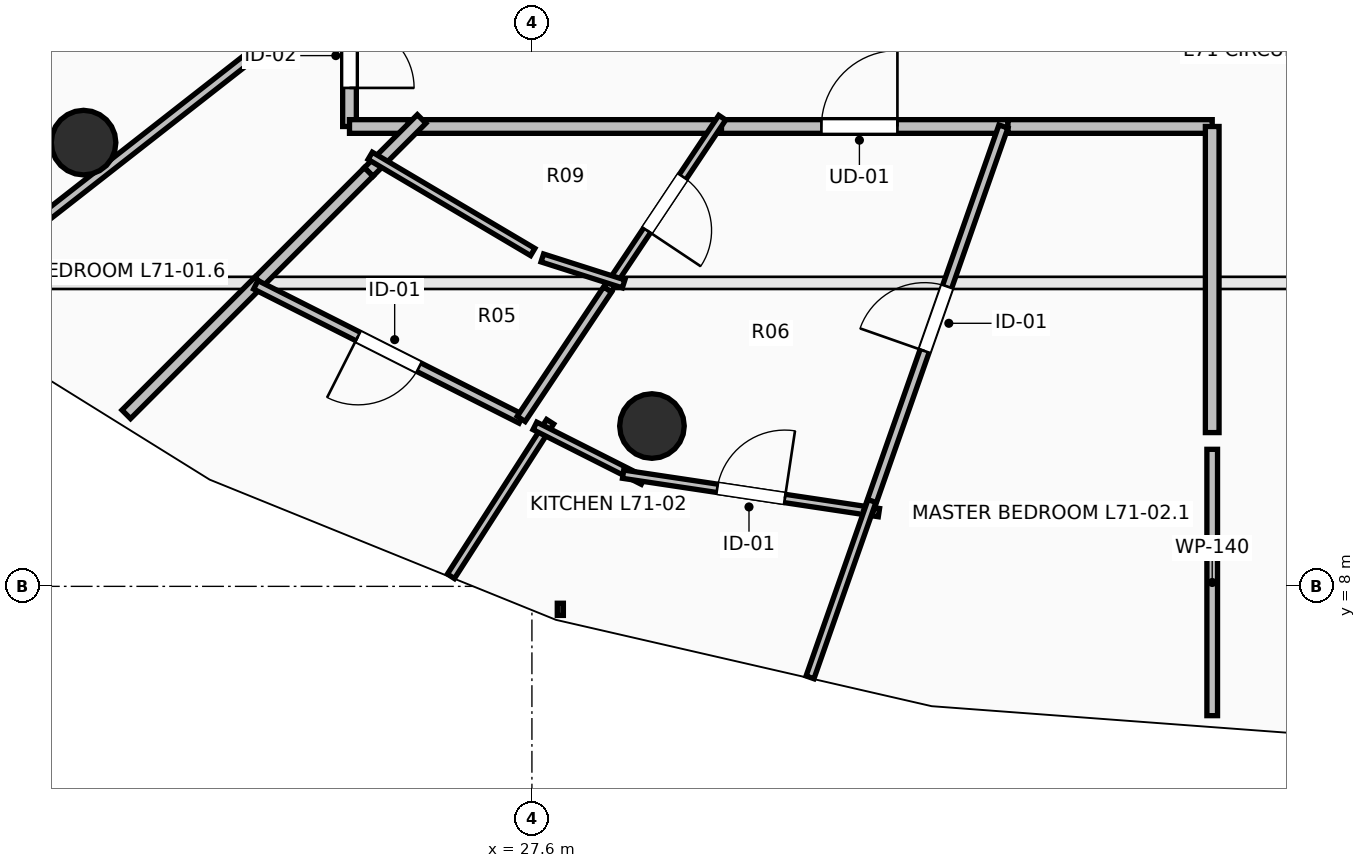
"""IFC4 building model, lengths in metres.
Left out: names, types, materials, properties, quantities, classifications, styles, units other than length and angle.
Written with IfcOpenShell. Run it as: python <this file> out.ifc"""

import sys

from ifc_helpers import new_model, si_unit, direction, frame, frame_2d, origin, origin_2d, place, context, subcontext, project, spatial, rectangle, circle, extrude, element, fill, save


model = new_model("IFC4")
c1 = context("Model", 3, precision=1e-05, world=origin(), true_north=direction((0.0, 1.0)))
c2 = subcontext(c1, "Body", "Model", "MODEL_VIEW")
j1 = project(units=[si_unit("LENGTHUNIT", "METRE"), si_unit("PLANEANGLEUNIT", "RADIAN")], contexts=[c1])
p1 = place(None, origin())
s1 = spatial("IfcSite", under=j1, at=p1, CompositionType="ELEMENT")
p2 = place(p1, origin())
s2 = spatial("IfcBuilding", under=s1, at=p2, CompositionType="ELEMENT")
p3 = place(p2, frame((0.0, 0.0, 262.65)))
s3 = spatial("IfcBuildingStorey", under=s2, at=p3, CompositionType="ELEMENT", Elevation=262.65)
for number, where, z_axis, x_axis in (
    (1, (21.701, 13.838, 0.0), (0.0, 0.0, 1.0), (-0.707, -0.707, 0.0)),
    (2, (29.179, 10.109, 0.0), (0.0, 0.0, 1.0), (-0.383, -0.924, 0.0)),
):
    element("IfcColumn", number, at=place(p3, frame(where, z_axis=z_axis, x_axis=x_axis)), inside=s3, PredefinedType="COLUMN", context=c2, shape_type="SweptSolid", body=[
        extrude(circle(Radius=0.425, at=origin_2d()), origin(), (0.0, 0.0, 1.0), 3.55),
    ])
p4 = place(p3, frame((25.2, 15.915, 0.0), z_axis=(0.0, 0.0, 1.0), x_axis=(0.0, -1.0, 0.0)))
e3 = element("IfcWall", 3, at=p4, inside=s3, PredefinedType="PARTITIONING", context=c2, shape_type="SweptSolid", body=[
    extrude(rectangle(XDim=1.865, YDim=0.18, at=frame_2d((0.933, 0.0))), origin(), (0.0, 0.0, 1.0), 2.482),
])
p5 = place(p4, frame((0.508, 0.0, 0.0)))
e4 = element("IfcOpeningElement", 4, at=p5, cuts=e3, PredefinedType="OPENING", context=c2, shape_type="SweptSolid", body=[
    extrude(rectangle(XDim=0.85, YDim=2.1, at=frame_2d((0.425, 1.05))), frame((0.0, 0.105, 0.0), z_axis=(0.0, -1.0, 0.0), x_axis=(1.0, 0.0, 0.0)), (0.0, 0.0, 1.0), 0.21),
])
p6 = place(p3, frame((25.2, 14.05, 0.0), z_axis=(0.0, 0.0, 1.0), x_axis=(1.0, 0.0, 0.0)))
e5 = element("IfcWall", 5, at=p6, inside=s3, PredefinedType="PARTITIONING", context=c2, shape_type="SweptSolid", body=[
    extrude(rectangle(XDim=0.91, YDim=0.18, at=frame_2d((0.455, 0.0))), origin(), (0.0, 0.0, 1.0), 3.022),
])
p7 = place(p3, frame((29.954, 14.05, 0.0), z_axis=(0.0, 0.0, 1.0), x_axis=(1.0, 0.0, 0.0)))
e6 = element("IfcWall", 6, at=p7, inside=s3, PredefinedType="PARTITIONING", context=c2, shape_type="SweptSolid", body=[
    extrude(rectangle(XDim=3.909, YDim=0.18, at=frame_2d((1.955, 0.0))), origin(), (0.0, 0.0, 1.0), 2.936),
])
p8 = place(p7, frame((1.455, 0.0, 0.0)))
e7 = element("IfcOpeningElement", 7, at=p8, cuts=e6, PredefinedType="OPENING", context=c2, shape_type="SweptSolid", body=[
    extrude(rectangle(XDim=1.0, YDim=2.15, at=frame_2d((0.5, 1.075))), frame((0.0, 0.105, 0.0), z_axis=(0.0, -1.0, 0.0), x_axis=(1.0, 0.0, 0.0)), (0.0, 0.0, 1.0), 0.21),
])
p9 = place(p3, frame((25.97, 14.05, 0.0), z_axis=(0.0, 0.0, 1.0), x_axis=(1.0, 0.0, 0.0)))
e8 = element("IfcWall", 8, at=p9, inside=s3, PredefinedType="PARTITIONING", context=c2, shape_type="SweptSolid", body=[
    extrude(rectangle(XDim=4.124, YDim=0.18, at=frame_2d((2.062, 0.0))), origin(), (0.0, 0.0, 1.0), 2.482),
])
p10 = place(p3, frame((33.863, 14.05, 0.0), z_axis=(0.0, 0.0, 1.0), x_axis=(1.0, 0.0, 0.0)))
e9 = element("IfcWall", 9, at=p10, inside=s3, PredefinedType="PARTITIONING", context=c2, shape_type="SweptSolid", body=[
    extrude(rectangle(XDim=2.687, YDim=0.18, at=frame_2d((1.344, 0.0))), origin(), (0.0, 0.0, 1.0), 2.936),
])
p11 = place(p3, frame((36.55, 14.05, 0.0), z_axis=(0.0, 0.0, 1.0), x_axis=(0.0, -1.0, 0.0)))
e10 = element("IfcWall", 10, at=p11, inside=s3, PredefinedType="PARTITIONING", context=c2, shape_type="SweptSolid", body=[
    extrude(rectangle(XDim=4.027, YDim=0.18, at=frame_2d((2.014, 0.0))), origin(), (0.0, 0.0, 1.0), 2.936),
])
p12 = place(p3, frame((17.602, 13.72, 0.0), z_axis=(0.0, 0.0, 1.0), x_axis=(0.856734134601, 0.515758298633, 0.0)))
e11 = element("IfcWall", 11, at=p12, inside=s3, PredefinedType="PARTITIONING", context=c2, shape_type="SweptSolid", body=[
    extrude(rectangle(XDim=8.868, YDim=0.125, at=frame_2d((4.434, 0.0))), origin(), (0.0, 0.0, 1.0), 2.482),
])
p13 = place(p3, frame((19.819, 11.782, 0.0), z_axis=(0.0, 0.0, 1.0), x_axis=(0.78765580417, 0.61611552014, 0.0)))
e12 = element("IfcWall", 12, at=p13, inside=s3, PredefinedType="PARTITIONING", context=c2, shape_type="SweptSolid", body=[
    extrude(rectangle(XDim=6.832, YDim=0.125, at=frame_2d((3.416, 0.0))), origin(), (0.0, 0.0, 1.0), 2.482),
])
p14 = place(p3, frame((22.263, 10.263, 0.0), z_axis=(0.0, 0.0, 1.0), x_axis=(0.707106781187, 0.707106781187, 0.0)))
e13 = element("IfcWall", 13, at=p14, inside=s3, PredefinedType="PARTITIONING", context=c2, shape_type="SweptSolid", body=[
    extrude(rectangle(XDim=2.473, YDim=0.16, at=frame_2d((1.237, 0.0))), origin(), (0.0, 0.0, 1.0), 3.29),
])
p15 = place(p3, frame((25.452, 13.452, 0.0), z_axis=(0.0, 0.0, 1.0), x_axis=(0.707106781187, 0.707106781187, 0.0)))
e14 = element("IfcWall", 14, at=p15, inside=s3, PredefinedType="PARTITIONING", context=c2, shape_type="SweptSolid", body=[
    extrude(rectangle(XDim=0.986, YDim=0.16, at=frame_2d((0.493, 0.0))), origin(), (0.0, 0.0, 1.0), 3.022),
])
p16 = place(p3, frame((24.012, 12.012, 0.0), z_axis=(0.0, 0.0, 1.0), x_axis=(0.707106781187, 0.707106781187, 0.0)))
e15 = element("IfcWall", 15, at=p16, inside=s3, PredefinedType="PARTITIONING", context=c2, shape_type="SweptSolid", body=[
    extrude(rectangle(XDim=2.036, YDim=0.16, at=frame_2d((1.018, 0.0))), origin(), (0.0, 0.0, 1.0), 2.874),
])
p17 = place(p3, frame((30.104, 14.167, 0.0), z_axis=(0.0, 0.0, 1.0), x_axis=(-0.555011080332, -0.831842954354, 0.0)))
e16 = element("IfcWall", 16, at=p17, inside=s3, PredefinedType="PARTITIONING", context=c2, shape_type="SweptSolid", body=[
    extrude(rectangle(XDim=2.718, YDim=0.11, at=frame_2d((1.359, 0.0))), origin(), (0.0, 0.0, 1.0), 2.482),
])
p18 = place(p17, frame((0.934, 0.0, 0.0)))
e17 = element("IfcOpeningElement", 17, at=p18, cuts=e16, PredefinedType="OPENING", context=c2, shape_type="SweptSolid", body=[
    extrude(rectangle(XDim=0.85, YDim=2.1, at=frame_2d((0.425, 1.05))), frame((0.0, 0.07, 0.0), z_axis=(0.0, -1.0, 0.0), x_axis=(1.0, 0.0, 0.0)), (0.0, 0.0, 1.0), 0.14),
])
p19 = place(p3, frame((26.534, 8.132, 0.0), z_axis=(0.0, 0.0, 1.0), x_axis=(0.540114041626, 0.841591838149, 0.0)))
e18 = element("IfcWall", 18, at=p19, inside=s3, PredefinedType="PARTITIONING", context=c2, shape_type="SweptSolid", body=[
    extrude(rectangle(XDim=2.417, YDim=0.11, at=frame_2d((1.208, 0.0))), origin(), (0.0, 0.0, 1.0), 3.29),
])
p20 = place(p3, frame((27.639, 10.111, 0.0), z_axis=(0.0, 0.0, 1.0), x_axis=(0.892614165752, -0.45082141819, 0.0)))
e19 = element("IfcWall", 19, at=p20, inside=s3, PredefinedType="PARTITIONING", context=c2, shape_type="SweptSolid", body=[
    extrude(rectangle(XDim=1.595, YDim=0.11, at=frame_2d((0.798, 0.0))), origin(), (0.0, 0.0, 1.0), 3.29),
])
p21 = place(p3, frame((28.8, 9.476, 0.0), z_axis=(0.0, 0.0, 1.0), x_axis=(0.988903707347, -0.148557926731, 0.0)))
e20 = element("IfcWall", 20, at=p21, inside=s3, PredefinedType="PARTITIONING", context=c2, shape_type="SweptSolid", body=[
    extrude(rectangle(XDim=3.404, YDim=0.11, at=frame_2d((1.702, 0.0))), origin(), (0.0, 0.0, 1.0), 3.29),
])
p22 = place(p21, frame((1.252, 0.0, 0.0)))
e21 = element("IfcOpeningElement", 21, at=p22, cuts=e20, PredefinedType="OPENING", context=c2, shape_type="SweptSolid", body=[
    extrude(rectangle(XDim=0.9, YDim=2.1, at=frame_2d((0.45, 1.05))), frame((0.0, 0.07, 0.0), z_axis=(0.0, -1.0, 0.0), x_axis=(1.0, 0.0, 0.0)), (0.0, 0.0, 1.0), 0.14),
])
p23 = place(p3, frame((27.459, 10.203, 0.0), z_axis=(0.0, 0.0, 1.0), x_axis=(-0.892559828496, 0.450928988374, 0.0)))
e22 = element("IfcWall", 22, at=p23, inside=s3, PredefinedType="PARTITIONING", context=c2, shape_type="SweptSolid", body=[
    extrude(rectangle(XDim=3.912, YDim=0.125, at=frame_2d((1.956, 0.0))), origin(), (0.0, 0.0, 1.0), 3.29),
])
p24 = place(p23, frame((1.506, 0.0, 0.0)))
e23 = element("IfcOpeningElement", 23, at=p24, cuts=e22, PredefinedType="OPENING", context=c2, shape_type="SweptSolid", body=[
    extrude(rectangle(XDim=0.9, YDim=2.1, at=frame_2d((0.45, 1.05))), frame((0.0, 0.077, 0.0), z_axis=(0.0, -1.0, 0.0), x_axis=(1.0, 0.0, 0.0)), (0.0, 0.0, 1.0), 0.155),
])
p25 = place(p3, frame((28.595, 11.906, 0.0), z_axis=(0.0, 0.0, 1.0), x_axis=(-0.555085472594, -0.831793314541, 0.0)))
e24 = element("IfcWall", 24, at=p25, inside=s3, PredefinedType="PARTITIONING", context=c2, shape_type="SweptSolid", body=[
    extrude(rectangle(XDim=2.047, YDim=0.125, at=frame_2d((1.023, 0.0))), origin(), (0.0, 0.0, 1.0), 2.482),
])
p26 = place(p3, frame((32.027, 8.991, 0.0), z_axis=(0.0, 0.0, 1.0), x_axis=(0.331214316781, 0.943555550224, 0.0)))
e25 = element("IfcWall", 25, at=p26, inside=s3, PredefinedType="PARTITIONING", context=c2, shape_type="SweptSolid", body=[
    extrude(rectangle(XDim=5.362, YDim=0.125, at=frame_2d((2.681, 0.0))), origin(), (0.0, 0.0, 1.0), 2.874),
])
p27 = place(p26, frame((2.231, 0.0, 0.0)))
e26 = element("IfcOpeningElement", 26, at=p27, cuts=e25, PredefinedType="OPENING", context=c2, shape_type="SweptSolid", body=[
    extrude(rectangle(XDim=0.9, YDim=2.1, at=frame_2d((0.45, 1.05))), frame((0.0, 0.077, 0.0), z_axis=(0.0, -1.0, 0.0), x_axis=(1.0, 0.0, 0.0)), (0.0, 0.0, 1.0), 0.155),
])
p28 = place(p3, frame((25.472, 13.664, 0.0), z_axis=(0.0, 0.0, 1.0), x_axis=(0.860546797705, -0.509371386082, 0.0)))
e27 = element("IfcWall", 27, at=p28, inside=s3, PredefinedType="PARTITIONING", context=c2, shape_type="SweptSolid", body=[
    extrude(rectangle(XDim=2.485, YDim=0.11, at=frame_2d((1.242, 0.0))), origin(), (0.0, 0.0, 1.0), 3.022),
])
p29 = place(p3, frame((27.737, 12.321, 0.0), z_axis=(0.0, 0.0, 1.0), x_axis=(0.952754298981, -0.303742071127, 0.0)))
e28 = element("IfcWall", 28, at=p29, inside=s3, PredefinedType="PARTITIONING", context=c2, shape_type="SweptSolid", body=[
    extrude(rectangle(XDim=1.123, YDim=0.11, at=frame_2d((0.562, 0.0))), origin(), (0.0, 0.0, 1.0), 2.482),
])
p30 = place(p3, frame((31.259, 6.803, 0.0), z_axis=(0.0, 0.0, 1.0), x_axis=(0.331407174133, 0.943487829775, 0.0)))
e29 = element("IfcWall", 29, at=p30, inside=s3, PredefinedType="PARTITIONING", context=c2, shape_type="SweptSolid", body=[
    extrude(rectangle(XDim=2.459, YDim=0.11, at=frame_2d((1.229, 0.0))), origin(), (0.0, 0.0, 1.0), 3.29),
])
p31 = place(p3, frame((36.55, 9.803, 0.0), z_axis=(0.0, 0.0, 1.0), x_axis=(0.0, -1.0, 0.0)))
e30 = element("IfcWall", 30, at=p31, inside=s3, PredefinedType="PARTITIONING", context=c2, shape_type="SweptSolid", body=[
    extrude(rectangle(XDim=3.504, YDim=0.14, at=frame_2d((1.752, 0.0))), origin(), (0.0, 0.0, 1.0), 2.874),
])
p32 = place(p8, origin())
e31 = element("IfcDoor", 31, at=p32, inside=s3, OperationType="SINGLE_SWING_RIGHT", PredefinedType="DOOR", context=c2, shape_type="SweptSolid", body=[
    extrude(rectangle(XDim=1.0, YDim=2.15, at=frame_2d((0.5, 1.075))), frame((0.0, 0.025, 0.0), z_axis=(0.0, -1.0, 0.0), x_axis=(1.0, 0.0, 0.0)), (0.0, 0.0, 1.0), 0.05),
])
fill(e7, e31)
p33 = place(p18, origin())
e32 = element("IfcDoor", 32, at=p33, inside=s3, OperationType="SINGLE_SWING_RIGHT", PredefinedType="DOOR", context=c2, shape_type="SweptSolid", body=[
    extrude(rectangle(XDim=0.85, YDim=2.1, at=frame_2d((0.425, 1.05))), frame((0.0, 0.025, 0.0), z_axis=(0.0, -1.0, 0.0), x_axis=(1.0, 0.0, 0.0)), (0.0, 0.0, 1.0), 0.05),
])
fill(e17, e32)
p34 = place(p22, origin())
e33 = element("IfcDoor", 33, at=p34, inside=s3, OperationType="SINGLE_SWING_RIGHT", PredefinedType="DOOR", context=c2, shape_type="SweptSolid", body=[
    extrude(rectangle(XDim=0.9, YDim=2.1, at=frame_2d((0.45, 1.05))), frame((0.0, 0.025, 0.0), z_axis=(0.0, -1.0, 0.0), x_axis=(1.0, 0.0, 0.0)), (0.0, 0.0, 1.0), 0.05),
])
fill(e21, e33)
p35 = place(p24, origin())
e34 = element("IfcDoor", 34, at=p35, inside=s3, OperationType="SINGLE_SWING_RIGHT", PredefinedType="DOOR", context=c2, shape_type="SweptSolid", body=[
    extrude(rectangle(XDim=0.9, YDim=2.1, at=frame_2d((0.45, 1.05))), frame((0.0, 0.025, 0.0), z_axis=(0.0, -1.0, 0.0), x_axis=(1.0, 0.0, 0.0)), (0.0, 0.0, 1.0), 0.05),
])
fill(e23, e34)
p36 = place(p27, origin())
e35 = element("IfcDoor", 35, at=p36, inside=s3, OperationType="SINGLE_SWING_LEFT", PredefinedType="DOOR", context=c2, shape_type="SweptSolid", body=[
    extrude(rectangle(XDim=0.9, YDim=2.1, at=frame_2d((0.45, 1.05))), frame((0.0, 0.025, 0.0), z_axis=(0.0, -1.0, 0.0), x_axis=(1.0, 0.0, 0.0)), (0.0, 0.0, 1.0), 0.05),
])
fill(e26, e35)
p37 = place(p5, origin())
e36 = element("IfcDoor", 36, at=p37, inside=s3, OperationType="SINGLE_SWING_RIGHT", PredefinedType="DOOR", context=c2, shape_type="SweptSolid", body=[
    extrude(rectangle(XDim=0.85, YDim=2.1, at=frame_2d((0.425, 1.05))), frame((0.0, 0.025, 0.0), z_axis=(0.0, -1.0, 0.0), x_axis=(1.0, 0.0, 0.0)), (0.0, 0.0, 1.0), 0.05),
])
fill(e4, e36)
save(model, sys.argv[1])
